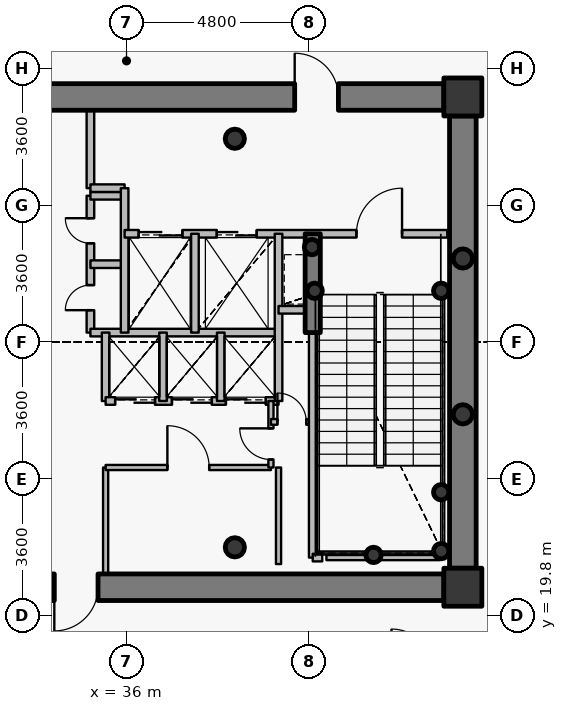
"""IFC4 building model, lengths in metres.
Left out: names, types, materials, properties, quantities, classifications, styles, units other than length and angle.
Written with IfcOpenShell. Run it as: python <this file> out.ifc"""

import sys

from ifc_helpers import new_model, si_unit, direction, frame, frame_2d, origin, origin_2d, place, context, subcontext, project, spatial, rectangle, hollow_circle, extrude, source, transform, mapped, element, fill, save


model = new_model("IFC4")
c1 = context("Model", 3, precision=1e-05, world=origin(), true_north=direction((0.0, 1.0)))
c2 = subcontext(c1, "Body", "Model", "MODEL_VIEW")
j1 = project(units=[si_unit("LENGTHUNIT", "METRE"), si_unit("PLANEANGLEUNIT", "RADIAN")], contexts=[c1])
p1 = place(None, origin())
s1 = spatial("IfcSite", under=j1, at=p1, CompositionType="ELEMENT")
p2 = place(p1, origin())
s2 = spatial("IfcBuilding", under=s1, at=p2, CompositionType="ELEMENT")
p3 = place(p2, frame((0.0, 0.0, 268.2)))
s3 = spatial("IfcBuildingStorey", under=s2, at=p3, CompositionType="ELEMENT", Elevation=268.2)
for number, where, z_axis, x_axis in (
    (1, (44.85, 20.55, 0.0), (0.0, 0.0, 1.0), (1.0, 0.0, 0.0)),
    (2, (44.85, 33.45, 0.0), (0.0, 0.0, 1.0), (1.0, 0.0, 0.0)),
):
    element("IfcColumn", number, at=place(p3, frame(where, z_axis=z_axis, x_axis=x_axis)), inside=s3, PredefinedType="COLUMN", context=c2, shape_type="SweptSolid", body=[
        extrude(rectangle(XDim=1.0, YDim=1.0, at=origin_2d()), origin(), (0.0, 0.0, 1.0), 4.8),
    ])
for number, where, z_axis, x_axis in (
    (3, (38.85, 21.6, 0.0), (0.0, 0.0, 1.0), (1.0, 0.0, 0.0)),
    (4, (38.85, 32.35, 0.0), (0.0, 0.0, 1.0), (1.0, 0.0, 0.0)),
):
    element("IfcColumn", number, at=place(p3, frame(where, z_axis=z_axis, x_axis=x_axis)), inside=s3, PredefinedType="COLUMN", context=c2, shape_type="SweptSolid", body=[
        extrude(hollow_circle(Radius=0.254, WallThickness=0.02, at=origin_2d()), origin(), (0.0, 0.0, 1.0), 4.8),
    ])
for number, where, z_axis, x_axis in (
    (5, (44.28, 21.5, 0.0), (0.0, 0.0, 1.0), (1.0, 0.0, 0.0)),
    (6, (44.28, 23.05, 0.0), (0.0, 0.0, 1.0), (1.0, 0.0, 0.0)),
    (7, (42.5, 21.4, 0.0), (0.0, 0.0, 1.0), (1.0, 0.0, 0.0)),
    (8, (40.95, 28.35, 0.0), (0.0, 0.0, 1.0), (1.0, 0.0, 0.0)),
    (9, (44.28, 28.35, 0.0), (0.0, 0.0, 1.0), (1.0, 0.0, 0.0)),
    (10, (40.88, 29.5, 0.0), (0.0, 0.0, 1.0), (1.0, 0.0, 0.0)),
):
    element("IfcColumn", number, at=place(p3, frame(where, z_axis=z_axis, x_axis=x_axis)), inside=s3, PredefinedType="COLUMN", context=c2, shape_type="SweptSolid", body=[
        extrude(hollow_circle(Radius=0.203, WallThickness=0.016, at=origin_2d()), origin(), (0.0, 0.0, 1.0), 4.8),
    ])
p4 = place(p3, frame((27.65, 33.45, 0.0), z_axis=(0.0, 0.0, 1.0), x_axis=(1.0, 0.0, 0.0)))
e11 = element("IfcWall", 11, at=p4, inside=s3, PredefinedType="SHEAR", context=c2, shape_type="SweptSolid", body=[
    extrude(rectangle(XDim=16.7, YDim=0.7, at=frame_2d((8.35, 0.0))), origin(), (0.0, 0.0, 1.0), 4.1),
])
p5 = place(p4, frame((12.775, 0.0, 0.0)))
e12 = element("IfcOpeningElement", 12, at=p5, cuts=e11, PredefinedType="OPENING", context=c2, shape_type="SweptSolid", body=[
    extrude(rectangle(XDim=1.15, YDim=2.15, at=origin_2d()), frame((0.575, 0.36, 1.075), z_axis=(0.0, -1.0, 0.0), x_axis=(1.0, 0.0, 0.0)), (0.0, 0.0, 1.0), 0.72),
])
p6 = place(p3, frame((44.85, 32.95, 0.0), z_axis=(0.0, 0.0, 1.0), x_axis=(0.0, -1.0, 0.0)))
e13 = element("IfcWall", 13, at=p6, inside=s3, PredefinedType="SHEAR", context=c2, shape_type="SweptSolid", body=[
    extrude(rectangle(XDim=11.9, YDim=0.7, at=frame_2d((5.95, 0.0))), origin(), (0.0, 0.0, 1.0), 4.1),
])
p7 = place(p3, frame((44.35, 20.55, 0.0), z_axis=(0.0, 0.0, 1.0), x_axis=(-1.0, 0.0, 0.0)))
e14 = element("IfcWall", 14, at=p7, inside=s3, PredefinedType="SHEAR", context=c2, shape_type="SweptSolid", body=[
    extrude(rectangle(XDim=16.7, YDim=0.7, at=frame_2d((8.35, 0.0))), origin(), (0.0, 0.0, 1.0), 4.1),
])
p8 = place(p7, frame((12.925, 0.0, 0.0)))
e15 = element("IfcOpeningElement", 15, at=p8, cuts=e14, PredefinedType="OPENING", context=c2, shape_type="SweptSolid", body=[
    extrude(rectangle(XDim=1.15, YDim=2.15, at=origin_2d()), frame((0.575, 0.36, 1.075), z_axis=(0.0, -1.0, 0.0), x_axis=(1.0, 0.0, 0.0)), (0.0, 0.0, 1.0), 0.72),
])
p9 = place(p7, frame((9.1, 0.0, 0.0)))
e16 = element("IfcOpeningElement", 16, at=p9, cuts=e14, PredefinedType="OPENING", context=c2, shape_type="SweptSolid", body=[
    extrude(rectangle(XDim=1.15, YDim=2.15, at=origin_2d()), frame((0.575, 0.36, 1.075), z_axis=(0.0, -1.0, 0.0), x_axis=(1.0, 0.0, 0.0)), (0.0, 0.0, 1.0), 0.72),
])
p10 = place(p3, frame((40.9, 27.25, 0.0), z_axis=(0.0, 0.0, 1.0), x_axis=(0.0, 1.0, 0.0)))
e17 = element("IfcWall", 17, at=p10, inside=s3, PredefinedType="SHEAR", context=c2, shape_type="SweptSolid", body=[
    extrude(rectangle(XDim=2.6, YDim=0.4, at=frame_2d((1.3, 0.0))), origin(), (0.0, 0.0, 1.0), 4.15),
])
for number, where, z_axis, x_axis in (
    (18, (44.85, 25.1, 0.0), (0.0, 0.0, 1.0), (1.0, 0.0, 0.0)),
    (19, (44.85, 29.2, 0.0), (0.0, 0.0, 1.0), (1.0, 0.0, 0.0)),
):
    element("IfcColumn", number, at=place(p3, frame(where, z_axis=z_axis, x_axis=x_axis)), inside=s3, PredefinedType="COLUMN", context=c2, shape_type="SweptSolid", body=[
        extrude(hollow_circle(Radius=0.254, WallThickness=0.02, at=origin_2d()), origin(), (0.0, 0.0, 1.0), 4.8),
    ])
p11 = place(p3, frame((35.05, 27.25, 0.0), z_axis=(0.0, 0.0, 1.0), x_axis=(0.0, 1.0, 0.0)))
e20 = element("IfcWall", 20, at=p11, inside=s3, PredefinedType="PARTITIONING", context=c2, shape_type="SweptSolid", body=[
    extrude(rectangle(XDim=3.6, YDim=0.2, at=frame_2d((1.8, 0.0))), origin(), (0.0, 0.0, 1.0), 4.55),
])
p12 = place(p11, frame((0.59, 0.0, 0.0)))
e21 = element("IfcOpeningElement", 21, at=p12, cuts=e20, PredefinedType="OPENING", context=c2, shape_type="SweptSolid", body=[
    extrude(rectangle(XDim=0.66, YDim=2.05, at=origin_2d()), frame((0.33, 0.11, 1.025), z_axis=(0.0, -1.0, 0.0), x_axis=(1.0, 0.0, 0.0)), (0.0, 0.0, 1.0), 0.22),
])
p13 = place(p11, frame((2.35, 0.0, 0.0)))
e22 = element("IfcOpeningElement", 22, at=p13, cuts=e20, PredefinedType="OPENING", context=c2, shape_type="SweptSolid", body=[
    extrude(rectangle(XDim=0.66, YDim=2.05, at=origin_2d()), frame((0.33, 0.11, 1.025), z_axis=(0.0, -1.0, 0.0), x_axis=(1.0, 0.0, 0.0)), (0.0, 0.0, 1.0), 0.22),
])
p14 = place(p3, frame((35.05, 27.25, 0.0), z_axis=(0.0, 0.0, 1.0), x_axis=(1.0, 0.0, 0.0)))
e23 = element("IfcWall", 23, at=p14, inside=s3, PredefinedType="PARTITIONING", context=c2, shape_type="SweptSolid", body=[
    extrude(rectangle(XDim=4.95, YDim=0.2, at=frame_2d((2.475, 0.0))), origin(), (0.0, 0.0, 1.0), 4.135),
])
for number, where, z_axis, x_axis in (
    (24, (35.05, 29.05, 0.0), (0.0, 0.0, 1.0), (1.0, 0.0, 0.0)),
    (25, (35.05, 30.85, 0.0), (0.0, 0.0, 1.0), (1.0, 0.0, 0.0)),
):
    element("IfcWall", number, at=place(p3, frame(where, z_axis=z_axis, x_axis=x_axis)), inside=s3, PredefinedType="PARTITIONING", context=c2, shape_type="SweptSolid", body=[
        extrude(rectangle(XDim=0.9, YDim=0.2, at=frame_2d((0.45, 0.0))), origin(), (0.0, 0.0, 1.0), 4.55),
    ])
p15 = place(p3, frame((35.05, 31.05, 0.0), z_axis=(0.0, 0.0, 1.0), x_axis=(0.0, 1.0, 0.0)))
e26 = element("IfcWall", 26, at=p15, inside=s3, PredefinedType="PARTITIONING", context=c2, shape_type="SweptSolid", body=[
    extrude(rectangle(XDim=2.05, YDim=0.2, at=frame_2d((1.025, 0.0))), origin(), (0.0, 0.0, 1.0), 4.135),
])
p16 = place(p3, frame((35.05, 31.05, 0.0), z_axis=(0.0, 0.0, 1.0), x_axis=(1.0, 0.0, 0.0)))
e27 = element("IfcWall", 27, at=p16, inside=s3, PredefinedType="PARTITIONING", context=c2, shape_type="SweptSolid", body=[
    extrude(rectangle(XDim=0.9, YDim=0.2, at=frame_2d((0.45, 0.0))), origin(), (0.0, 0.0, 1.0), 4.55),
])
p17 = place(p3, frame((35.45, 20.9, 0.0), z_axis=(0.0, 0.0, 1.0), x_axis=(0.0, 1.0, 0.0)))
e28 = element("IfcWall", 28, at=p17, inside=s3, PredefinedType="PARTITIONING", context=c2, shape_type="SweptSolid", body=[
    extrude(rectangle(XDim=2.8, YDim=0.135, at=frame_2d((1.4, 0.0))), origin(), (0.0, 0.0, 1.0), 4.135),
])
p18 = place(p3, frame((35.45, 23.7, 0.0), z_axis=(0.0, 0.0, 1.0), x_axis=(1.0, 0.0, 0.0)))
e29 = element("IfcWall", 29, at=p18, inside=s3, PredefinedType="PARTITIONING", context=c2, shape_type="SweptSolid", body=[
    extrude(rectangle(XDim=4.35, YDim=0.135, at=frame_2d((2.175, 0.0))), origin(), (0.0, 0.0, 1.0), 4.135),
])
p19 = place(p18, frame((1.625, 0.0, 0.0)))
e30 = element("IfcOpeningElement", 30, at=p19, cuts=e29, PredefinedType="OPENING", context=c2, shape_type="SweptSolid", body=[
    extrude(rectangle(XDim=1.1, YDim=2.15, at=origin_2d()), frame((0.55, 0.078, 1.075), z_axis=(0.0, -1.0, 0.0), x_axis=(1.0, 0.0, 0.0)), (0.0, 0.0, 1.0), 0.155),
])
p20 = place(p3, frame((35.45, 25.45, 0.0), z_axis=(0.0, 0.0, 1.0), x_axis=(0.0, 1.0, 0.0)))
e31 = element("IfcWall", 31, at=p20, inside=s3, PredefinedType="PARTITIONING", context=c2, shape_type="SweptSolid", body=[
    extrude(rectangle(XDim=1.8, YDim=0.2, at=frame_2d((0.9, 0.0))), origin(), (0.0, 0.0, 1.0), 4.55),
])
p21 = place(p3, frame((35.45, 25.45, 0.0), z_axis=(0.0, 0.0, 1.0), x_axis=(1.0, 0.0, 0.0)))
e32 = element("IfcWall", 32, at=p21, inside=s3, PredefinedType="PARTITIONING", context=c2, shape_type="SweptSolid", body=[
    extrude(rectangle(XDim=4.55, YDim=0.2, at=frame_2d((2.275, 0.0))), origin(), (0.0, 0.0, 1.0), 4.135),
])
p22 = place(p21, frame((0.25, 0.0, 0.0)))
e33 = element("IfcOpeningElement", 33, at=p22, cuts=e32, PredefinedType="OPENING", context=c2, shape_type="SweptSolid", body=[
    extrude(rectangle(XDim=1.05, YDim=2.15, at=origin_2d()), frame((0.525, 0.11, 1.075), z_axis=(0.0, -1.0, 0.0), x_axis=(1.0, 0.0, 0.0)), (0.0, 0.0, 1.0), 0.22),
])
p23 = place(p21, frame((1.745, 0.0, 0.0)))
e34 = element("IfcOpeningElement", 34, at=p23, cuts=e32, PredefinedType="OPENING", context=c2, shape_type="SweptSolid", body=[
    extrude(rectangle(XDim=1.05, YDim=2.15, at=origin_2d()), frame((0.525, 0.11, 1.075), z_axis=(0.0, -1.0, 0.0), x_axis=(1.0, 0.0, 0.0)), (0.0, 0.0, 1.0), 0.22),
])
p24 = place(p21, frame((3.165, 0.0, 0.0)))
e35 = element("IfcOpeningElement", 35, at=p24, cuts=e32, PredefinedType="OPENING", context=c2, shape_type="SweptSolid", body=[
    extrude(rectangle(XDim=1.05, YDim=2.15, at=origin_2d()), frame((0.525, 0.11, 1.075), z_axis=(0.0, -1.0, 0.0), x_axis=(1.0, 0.0, 0.0)), (0.0, 0.0, 1.0), 0.22),
])
p25 = place(p3, frame((35.95, 27.25, 0.0), z_axis=(0.0, 0.0, 1.0), x_axis=(0.0, 1.0, 0.0)))
e36 = element("IfcWall", 36, at=p25, inside=s3, PredefinedType="PARTITIONING", context=c2, shape_type="SweptSolid", body=[
    extrude(rectangle(XDim=3.8, YDim=0.2, at=frame_2d((1.9, 0.0))), origin(), (0.0, 0.0, 1.0), 4.55),
])
p26 = place(p3, frame((35.95, 29.85, 0.0), z_axis=(0.0, 0.0, 1.0), x_axis=(1.0, 0.0, 0.0)))
e37 = element("IfcWall", 37, at=p26, inside=s3, PredefinedType="PARTITIONING", context=c2, shape_type="SweptSolid", body=[
    extrude(rectangle(XDim=8.49, YDim=0.2, at=frame_2d((4.245, 0.0))), origin(), (0.0, 0.0, 1.0), 4.135),
])
p27 = place(p26, frame((6.1, 0.0, 0.0)))
e38 = element("IfcOpeningElement", 38, at=p27, cuts=e37, PredefinedType="OPENING", context=c2, shape_type="SweptSolid", body=[
    extrude(rectangle(XDim=1.2, YDim=2.15, at=origin_2d()), frame((0.6, 0.11, 1.075), z_axis=(0.0, -1.0, 0.0), x_axis=(1.0, 0.0, 0.0)), (0.0, 0.0, 1.0), 0.22),
])
p28 = place(p26, frame((0.37, 0.0, 0.0)))
e39 = element("IfcOpeningElement", 39, at=p28, cuts=e37, PredefinedType="OPENING", context=c2, shape_type="SweptSolid", body=[
    extrude(rectangle(XDim=1.15, YDim=2.15, at=origin_2d()), frame((0.575, 0.11, 1.075), z_axis=(0.0, -1.0, 0.0), x_axis=(1.0, 0.0, 0.0)), (0.0, 0.0, 1.0), 0.22),
])
p29 = place(p26, frame((2.425, 0.0, 0.0)))
e40 = element("IfcOpeningElement", 40, at=p29, cuts=e37, PredefinedType="OPENING", context=c2, shape_type="SweptSolid", body=[
    extrude(rectangle(XDim=1.05, YDim=2.15, at=origin_2d()), frame((0.525, 0.11, 1.075), z_axis=(0.0, -1.0, 0.0), x_axis=(1.0, 0.0, 0.0)), (0.0, 0.0, 1.0), 0.22),
])
p30 = place(p3, frame((36.96, 25.45, 0.0), z_axis=(0.0, 0.0, 1.0), x_axis=(0.0, 1.0, 0.0)))
e41 = element("IfcWall", 41, at=p30, inside=s3, PredefinedType="PARTITIONING", context=c2, shape_type="SweptSolid", body=[
    extrude(rectangle(XDim=1.8, YDim=0.2, at=frame_2d((0.9, 0.0))), origin(), (0.0, 0.0, 1.0), 4.55),
])
p31 = place(p3, frame((37.8, 27.25, 0.0), z_axis=(0.0, 0.0, 1.0), x_axis=(0.0, 1.0, 0.0)))
e42 = element("IfcWall", 42, at=p31, inside=s3, PredefinedType="PARTITIONING", context=c2, shape_type="SweptSolid", body=[
    extrude(rectangle(XDim=2.6, YDim=0.2, at=frame_2d((1.3, 0.0))), origin(), (0.0, 0.0, 1.0), 4.55),
])
p32 = place(p3, frame((38.48, 25.45, 0.0), z_axis=(0.0, 0.0, 1.0), x_axis=(0.0, 1.0, 0.0)))
e43 = element("IfcWall", 43, at=p32, inside=s3, PredefinedType="PARTITIONING", context=c2, shape_type="SweptSolid", body=[
    extrude(rectangle(XDim=1.8, YDim=0.2, at=frame_2d((0.9, 0.0))), origin(), (0.0, 0.0, 1.0), 4.55),
])
p33 = place(p3, frame((39.8, 23.7, 0.0), z_axis=(0.0, 0.0, 1.0), x_axis=(0.0, 1.0, 0.0)))
e44 = element("IfcWall", 44, at=p33, inside=s3, PredefinedType="PARTITIONING", context=c2, shape_type="SweptSolid", body=[
    extrude(rectangle(XDim=1.75, YDim=0.135, at=frame_2d((0.875, 0.0))), origin(), (0.0, 0.0, 1.0), 4.55),
])
p34 = place(p33, frame((0.21, 0.0, 0.0)))
e45 = element("IfcOpeningElement", 45, at=p34, cuts=e44, PredefinedType="OPENING", context=c2, shape_type="SweptSolid", body=[
    extrude(rectangle(XDim=0.82, YDim=2.1, at=origin_2d()), frame((0.41, 0.078, 1.05), z_axis=(0.0, -1.0, 0.0), x_axis=(1.0, 0.0, 0.0)), (0.0, 0.0, 1.0), 0.155),
])
p35 = place(p3, frame((39.8, 24.9, 0.0), z_axis=(0.0, 0.0, 1.0), x_axis=(1.0, 0.0, 0.0)))
e46 = element("IfcWall", 46, at=p35, inside=s3, PredefinedType="PARTITIONING", context=c2, shape_type="SweptSolid", body=[
    extrude(rectangle(XDim=1.1, YDim=0.15, at=frame_2d((0.55, 0.0))), origin(), (0.0, 0.0, 1.0), 4.55),
])
p36 = place(p35, frame((0.17, 0.0, 0.0)))
e47 = element("IfcOpeningElement", 47, at=p36, cuts=e46, PredefinedType="OPENING", context=c2, shape_type="SweptSolid", body=[
    extrude(rectangle(XDim=0.76, YDim=2.1, at=origin_2d()), frame((0.38, 0.085, 1.05), z_axis=(0.0, -1.0, 0.0), x_axis=(1.0, 0.0, 0.0)), (0.0, 0.0, 1.0), 0.17),
])
p37 = place(p3, frame((40.0, 25.45, 0.0), z_axis=(0.0, 0.0, 1.0), x_axis=(0.0, 1.0, 0.0)))
e48 = element("IfcWall", 48, at=p37, inside=s3, PredefinedType="PARTITIONING", context=c2, shape_type="SweptSolid", body=[
    extrude(rectangle(XDim=4.4, YDim=0.2, at=frame_2d((2.2, 0.0))), origin(), (0.0, 0.0, 1.0), 4.55),
])
p38 = place(p3, frame((40.0, 27.85, 0.0), z_axis=(0.0, 0.0, 1.0), x_axis=(1.0, 0.0, 0.0)))
e49 = element("IfcWall", 49, at=p38, inside=s3, PredefinedType="PARTITIONING", context=c2, shape_type="SweptSolid", body=[
    extrude(rectangle(XDim=0.9, YDim=0.2, at=frame_2d((0.45, 0.0))), origin(), (0.0, 0.0, 1.0), 4.55),
])
p39 = place(p3, frame((40.9, 21.33, 0.0), z_axis=(0.0, 0.0, 1.0), x_axis=(0.0, 1.0, 0.0)))
e50 = element("IfcWall", 50, at=p39, inside=s3, PredefinedType="PARTITIONING", context=c2, shape_type="SweptSolid", body=[
    extrude(rectangle(XDim=5.91, YDim=0.2, at=frame_2d((2.955, 0.0))), origin(), (0.0, 0.0, 1.0), 4.085),
])
p40 = place(p3, frame((40.9, 21.33, 0.0), z_axis=(0.0, 0.0, 1.0), x_axis=(1.0, 0.0, 0.0)))
e51 = element("IfcWall", 51, at=p40, inside=s3, PredefinedType="PARTITIONING", context=c2, shape_type="SweptSolid", body=[
    extrude(rectangle(XDim=0.25, YDim=0.2, at=frame_2d((0.125, 0.0))), origin(), (0.0, 0.0, 1.0), 4.085),
])
p41 = place(p3, frame((44.24, 21.33, 0.0), z_axis=(0.0, 0.0, 1.0), x_axis=(-1.0, 0.0, 0.0)))
e52 = element("IfcWall", 52, at=p41, inside=s3, PredefinedType="PARTITIONING", context=c2, shape_type="SweptSolid", body=[
    extrude(rectangle(XDim=2.98, YDim=0.135, at=frame_2d((1.49, 0.0))), origin(), (0.0, 0.0, 1.0), 4.085),
])
p42 = place(p3, frame((40.0, 23.7, 0.0), z_axis=(0.0, 0.0, 1.0), x_axis=(0.0, -1.0, 0.0)))
e53 = element("IfcWall", 53, at=p42, inside=s3, PredefinedType="PARTITIONING", context=c2, shape_type="SweptSolid", body=[
    extrude(rectangle(XDim=2.54, YDim=0.135, at=frame_2d((1.27, 0.0))), origin(), (0.0, 0.0, 1.0), 4.085),
])
for number, where, z_axis, x_axis in (
    (54, (45.2, 33.8, 0.0), (0.0, 0.0, 1.0), (-1.0, 0.0, 0.0)),
    (55, (44.36, 20.2, 0.0), (0.0, 0.0, 1.0), (1.0, 0.0, 0.0)),
):
    element("IfcWall", number, at=place(p3, frame(where, z_axis=z_axis, x_axis=x_axis)), inside=s3, PredefinedType="PARTITIONING", context=c2, shape_type="SweptSolid", body=[
        extrude(rectangle(XDim=0.84, YDim=0.135, at=frame_2d((0.42, 0.0))), origin(), (0.0, 0.0, 1.0), 4.085),
    ])
for number, where, z_axis, x_axis in (
    (56, (45.2, 20.508, 0.0), (0.0, 0.0, 1.0), (0.0, 1.0, 0.0)),
    (57, (45.2, 32.96, 0.0), (0.0, 0.0, 1.0), (0.0, 1.0, 0.0)),
):
    element("IfcWall", number, at=place(p3, frame(where, z_axis=z_axis, x_axis=x_axis)), inside=s3, PredefinedType="PARTITIONING", context=c2, shape_type="SweptSolid", body=[
        extrude(rectangle(XDim=0.532, YDim=0.135, at=frame_2d((0.266, 0.0))), origin(), (0.0, 0.0, 1.0), 4.55),
    ])
m1 = source(origin(), c2, "Body", "SweptSolid", [
    extrude(rectangle(XDim=1.15, YDim=2.15, at=origin_2d()), frame((0.575, 0.025, 1.075), z_axis=(0.0, -1.0, 0.0), x_axis=(1.0, 0.0, 0.0)), (0.0, 0.0, 1.0), 0.05),
])
p43 = place(p5, origin())
e58 = element("IfcDoor", 58, at=p43, inside=s3, OperationType="SINGLE_SWING_LEFT", PredefinedType="DOOR", context=c2, shape_type="MappedRepresentation", body=[
    mapped(m1, transform((0.0, 0.0, 0.0), x_axis=(1.0, 0.0, 0.0), y_axis=(0.0, 1.0, 0.0), z_axis=(0.0, 0.0, 1.0), scale=1.0)),
])
fill(e12, e58)
p44 = place(p9, origin())
e59 = element("IfcDoor", 59, at=p44, inside=s3, OperationType="SINGLE_SWING_RIGHT", PredefinedType="DOOR", context=c2, shape_type="MappedRepresentation", body=[
    mapped(m1, transform((0.0, 0.0, 0.0), x_axis=(1.0, 0.0, 0.0), y_axis=(0.0, 1.0, 0.0), z_axis=(0.0, 0.0, 1.0), scale=1.0)),
])
fill(e16, e59)
m2 = source(origin(), c2, "Body", "SweptSolid", [
    extrude(rectangle(XDim=1.2, YDim=2.15, at=origin_2d()), frame((0.6, 0.025, 1.075), z_axis=(0.0, -1.0, 0.0), x_axis=(1.0, 0.0, 0.0)), (0.0, 0.0, 1.0), 0.05),
])
p45 = place(p27, origin())
e60 = element("IfcDoor", 60, at=p45, inside=s3, OperationType="SINGLE_SWING_RIGHT", PredefinedType="DOOR", context=c2, shape_type="MappedRepresentation", body=[
    mapped(m2, transform((0.0, 0.0, 0.0), x_axis=(1.0, 0.0, 0.0), y_axis=(0.0, 1.0, 0.0), z_axis=(0.0, 0.0, 1.0), scale=1.0)),
])
fill(e38, e60)
m3 = source(origin(), c2, "Body", "SweptSolid", [
    extrude(rectangle(XDim=1.15, YDim=2.15, at=origin_2d()), frame((0.575, 0.025, 1.075), z_axis=(0.0, -1.0, 0.0), x_axis=(1.0, 0.0, 0.0)), (0.0, 0.0, 1.0), 0.05),
])
p46 = place(p28, origin())
e61 = element("IfcDoor", 61, at=p46, inside=s3, OperationType="DOUBLE_DOOR_SLIDING", PredefinedType="USERDEFINED", context=c2, shape_type="MappedRepresentation", body=[
    mapped(m3, transform((0.0, 0.0, 0.0), x_axis=(1.0, 0.0, 0.0), y_axis=(0.0, 1.0, 0.0), z_axis=(0.0, 0.0, 1.0), scale=1.0)),
])
fill(e39, e61)
m4 = source(origin(), c2, "Body", "SweptSolid", [
    extrude(rectangle(XDim=1.05, YDim=2.15, at=origin_2d()), frame((0.525, 0.025, 1.075), z_axis=(0.0, -1.0, 0.0), x_axis=(1.0, 0.0, 0.0)), (0.0, 0.0, 1.0), 0.05),
])
p47 = place(p29, origin())
e62 = element("IfcDoor", 62, at=p47, inside=s3, OperationType="DOUBLE_DOOR_SLIDING", PredefinedType="USERDEFINED", context=c2, shape_type="MappedRepresentation", body=[
    mapped(m4, transform((0.0, 0.0, 0.0), x_axis=(1.0, 0.0, 0.0), y_axis=(0.0, 1.0, 0.0), z_axis=(0.0, 0.0, 1.0), scale=1.0)),
])
fill(e40, e62)
p48 = place(p22, origin())
e63 = element("IfcDoor", 63, at=p48, inside=s3, OperationType="DOUBLE_DOOR_SLIDING", PredefinedType="USERDEFINED", context=c2, shape_type="MappedRepresentation", body=[
    mapped(m4, transform((0.0, 0.0, 0.0), x_axis=(1.0, 0.0, 0.0), y_axis=(0.0, 1.0, 0.0), z_axis=(0.0, 0.0, 1.0), scale=1.0)),
])
fill(e33, e63)
p49 = place(p23, origin())
e64 = element("IfcDoor", 64, at=p49, inside=s3, OperationType="DOUBLE_DOOR_SLIDING", PredefinedType="USERDEFINED", context=c2, shape_type="MappedRepresentation", body=[
    mapped(m4, transform((0.0, 0.0, 0.0), x_axis=(1.0, 0.0, 0.0), y_axis=(0.0, 1.0, 0.0), z_axis=(0.0, 0.0, 1.0), scale=1.0)),
])
fill(e34, e64)
p50 = place(p24, origin())
e65 = element("IfcDoor", 65, at=p50, inside=s3, OperationType="DOUBLE_DOOR_SLIDING", PredefinedType="USERDEFINED", context=c2, shape_type="MappedRepresentation", body=[
    mapped(m4, transform((0.0, 0.0, 0.0), x_axis=(1.0, 0.0, 0.0), y_axis=(0.0, 1.0, 0.0), z_axis=(0.0, 0.0, 1.0), scale=1.0)),
])
fill(e35, e65)
m5 = source(origin(), c2, "Body", "SweptSolid", [
    extrude(rectangle(XDim=0.66, YDim=2.05, at=origin_2d()), frame((0.33, 0.025, 1.025), z_axis=(0.0, -1.0, 0.0), x_axis=(1.0, 0.0, 0.0)), (0.0, 0.0, 1.0), 0.05),
])
p51 = place(p12, origin())
e66 = element("IfcDoor", 66, at=p51, inside=s3, OperationType="SINGLE_SWING_LEFT", PredefinedType="USERDEFINED", context=c2, shape_type="MappedRepresentation", body=[
    mapped(m5, transform((0.0, 0.0, 0.0), x_axis=(1.0, 0.0, 0.0), y_axis=(0.0, 1.0, 0.0), z_axis=(0.0, 0.0, 1.0), scale=1.0)),
])
fill(e21, e66)
p52 = place(p13, origin())
e67 = element("IfcDoor", 67, at=p52, inside=s3, OperationType="SINGLE_SWING_RIGHT", PredefinedType="USERDEFINED", context=c2, shape_type="MappedRepresentation", body=[
    mapped(m5, transform((0.0, 0.0, 0.0), x_axis=(1.0, 0.0, 0.0), y_axis=(0.0, 1.0, 0.0), z_axis=(0.0, 0.0, 1.0), scale=1.0)),
])
fill(e22, e67)
m6 = source(origin(), c2, "Body", "SweptSolid", [
    extrude(rectangle(XDim=1.1, YDim=2.15, at=origin_2d()), frame((0.55, 0.025, 1.075), z_axis=(0.0, -1.0, 0.0), x_axis=(1.0, 0.0, 0.0)), (0.0, 0.0, 1.0), 0.05),
])
p53 = place(p19, origin())
e68 = element("IfcDoor", 68, at=p53, inside=s3, OperationType="SINGLE_SWING_LEFT", PredefinedType="DOOR", context=c2, shape_type="MappedRepresentation", body=[
    mapped(m6, transform((0.0, 0.0, 0.0), x_axis=(1.0, 0.0, 0.0), y_axis=(0.0, 1.0, 0.0), z_axis=(0.0, 0.0, 1.0), scale=1.0)),
])
fill(e30, e68)
m7 = source(origin(), c2, "Body", "SweptSolid", [
    extrude(rectangle(XDim=0.82, YDim=2.1, at=origin_2d()), frame((0.41, 0.025, 1.05), z_axis=(0.0, -1.0, 0.0), x_axis=(1.0, 0.0, 0.0)), (0.0, 0.0, 1.0), 0.05),
])
p54 = place(p34, origin())
e69 = element("IfcDoor", 69, at=p54, inside=s3, OperationType="SINGLE_SWING_RIGHT", PredefinedType="DOOR", context=c2, shape_type="MappedRepresentation", body=[
    mapped(m7, transform((0.0, 0.0, 0.0), x_axis=(1.0, 0.0, 0.0), y_axis=(0.0, 1.0, 0.0), z_axis=(0.0, 0.0, 1.0), scale=1.0)),
])
fill(e45, e69)
m8 = source(origin(), c2, "Body", "SweptSolid", [
    extrude(rectangle(XDim=0.76, YDim=2.1, at=origin_2d()), frame((0.38, 0.025, 1.05), z_axis=(0.0, -1.0, 0.0), x_axis=(1.0, 0.0, 0.0)), (0.0, 0.0, 1.0), 0.05),
])
p55 = place(p36, origin())
e70 = element("IfcDoor", 70, at=p55, inside=s3, OperationType="SINGLE_SWING_LEFT", PredefinedType="DOOR", context=c2, shape_type="MappedRepresentation", body=[
    mapped(m8, transform((0.0, 0.0, 0.0), x_axis=(1.0, 0.0, 0.0), y_axis=(0.0, 1.0, 0.0), z_axis=(0.0, 0.0, 1.0), scale=1.0)),
])
fill(e47, e70)
save(model, sys.argv[1])
